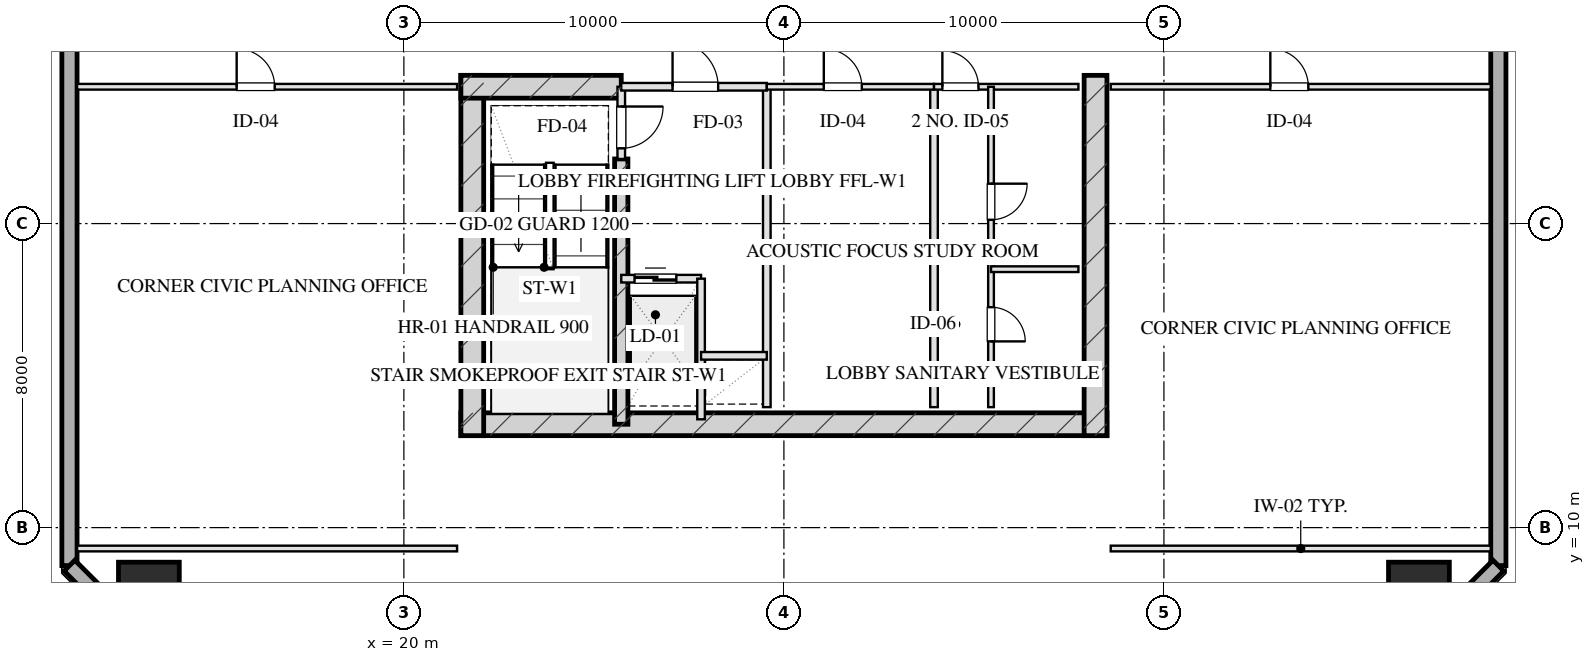
"""IFC4 building model, lengths in metres.
Left out: names, types, materials, properties, quantities, classifications, styles, units other than length and angle.
Written with IfcOpenShell. Run it as: python <this file> out.ifc"""

import sys

from ifc_helpers import new_model, si_unit, direction, frame, frame_2d, origin, origin_2d, place, context, subcontext, project, spatial, rectangle, hollow_rectangle, extrude, element, fill, save


model = new_model("IFC4")
c1 = context("Model", 3, precision=1e-05, world=origin(), true_north=direction((0.0, 1.0)))
c2 = subcontext(c1, "Body", "Model", "MODEL_VIEW")
j1 = project(units=[si_unit("LENGTHUNIT", "METRE"), si_unit("PLANEANGLEUNIT", "RADIAN")], contexts=[c1])
p1 = place(None, origin())
s1 = spatial("IfcSite", under=j1, at=p1, CompositionType="ELEMENT")
p2 = place(p1, origin())
s2 = spatial("IfcBuilding", under=s1, at=p2, CompositionType="ELEMENT")
p3 = place(p2, frame((0.0, 0.0, 146.05)))
s3 = spatial("IfcBuildingStorey", under=s2, at=p3, CompositionType="ELEMENT", Elevation=146.05)
p4 = place(p3, frame((21.5, 12.72, 0.0), z_axis=(0.0, 0.0, 1.0), x_axis=(1.0, 0.0, 0.0)))
e1 = element("IfcWall", 1, at=p4, inside=s3, PredefinedType="SHEAR", context=c2, shape_type="SweptSolid", body=[
    extrude(rectangle(XDim=17.0, YDim=0.6, at=frame_2d((8.5, 0.0))), origin(), (0.0, 0.0, 1.0), 3.45),
])
for number, where, z_axis, x_axis in (
    (2, (21.8, 21.9, 0.0), (0.0, 0.0, 1.0), (0.0, -1.0, 0.0)),
    (3, (38.2, 21.9, 0.0), (0.0, 0.0, 1.0), (0.0, -1.0, 0.0)),
):
    element("IfcWall", number, at=place(p3, frame(where, z_axis=z_axis, x_axis=x_axis)), inside=s3, PredefinedType="SHEAR", context=c2, shape_type="SweptSolid", body=[
        extrude(rectangle(XDim=9.48, YDim=0.6, at=frame_2d((4.74, 0.0))), origin(), (0.0, 0.0, 1.0), 3.45),
    ])
p5 = place(p3, frame((25.72, 19.7, 0.0), z_axis=(0.0, 0.0, 1.0), x_axis=(0.0, -1.0, 0.0)))
e4 = element("IfcWall", 4, at=p5, inside=s3, PredefinedType="SHEAR", context=c2, shape_type="SweptSolid", body=[
    extrude(rectangle(XDim=6.98, YDim=0.35, at=frame_2d((3.49, 0.0))), origin(), (0.0, 0.0, 1.0), 3.45),
])
p6 = place(p3, frame((21.5, 21.6, 0.0), z_axis=(0.0, 0.0, 1.0), x_axis=(1.0, 0.0, 0.0)))
e5 = element("IfcWall", 5, at=p6, inside=s3, PredefinedType="SHEAR", context=c2, shape_type="SweptSolid", body=[
    extrude(rectangle(XDim=4.22, YDim=0.6, at=frame_2d((2.11, 0.0))), origin(), (0.0, 0.0, 1.0), 3.45),
])
for number, where, z_axis, x_axis in (
    (6, (13.29, 8.29, 0.0), (0.0, 0.0, 1.0), (1.0, 0.0, 0.0)),
    (7, (46.71, 8.29, 0.0), (0.0, 0.0, 1.0), (1.0, 0.0, 0.0)),
):
    element("IfcColumn", number, at=place(p3, frame(where, z_axis=z_axis, x_axis=x_axis)), inside=s3, PredefinedType="COLUMN", context=c2, shape_type="SweptSolid", body=[
        extrude(hollow_rectangle(XDim=1.6, YDim=1.6, WallThickness=0.055, at=origin_2d()), origin(), (0.0, 0.0, 1.0), 3.451),
    ])
p7 = place(p3, frame((11.2, 9.0, 0.0), z_axis=(0.0, 0.0, 1.0), x_axis=(0.0, 1.0, 0.0)))
e8 = element("IfcWall", 8, at=p7, inside=s3, PredefinedType="SOLIDWALL", context=c2, shape_type="SweptSolid", body=[
    extrude(rectangle(XDim=50.0, YDim=0.4, at=frame_2d((25.0, 0.0))), origin(), (0.0, 0.0, 1.0), 2.61),
])
p8 = place(p7, frame((20.05, 0.0, 0.0)))
e9 = element("IfcOpeningElement", 9, at=p8, cuts=e8, PredefinedType="OPENING", context=c2, shape_type="SweptSolid", body=[
    extrude(rectangle(XDim=1.1, YDim=2.15, at=frame_2d((0.55, 1.075))), frame((0.0, 0.21, 0.0), z_axis=(0.0, -1.0, 0.0), x_axis=(1.0, 0.0, 0.0)), (0.0, 0.0, 1.0), 0.42),
])
p9 = place(p3, frame((48.8, 59.0, 0.0), z_axis=(0.0, 0.0, 1.0), x_axis=(0.0, -1.0, 0.0)))
e10 = element("IfcWall", 10, at=p9, inside=s3, PredefinedType="SOLIDWALL", context=c2, shape_type="SweptSolid", body=[
    extrude(rectangle(XDim=50.0, YDim=0.4, at=frame_2d((25.0, 0.0))), origin(), (0.0, 0.0, 1.0), 2.61),
])
p10 = place(p9, frame((17.475, 0.0, 0.75)))
e11 = element("IfcOpeningElement", 11, at=p10, cuts=e10, PredefinedType="OPENING", context=c2, shape_type="SweptSolid", body=[
    extrude(rectangle(XDim=2.25, YDim=1.46, at=frame_2d((1.125, 0.73))), frame((0.0, 0.21, 0.0), z_axis=(0.0, -1.0, 0.0), x_axis=(1.0, 0.0, 0.0)), (0.0, 0.0, 1.0), 0.42),
])
p11 = place(p9, frame((30.258, 0.0, 0.0)))
e12 = element("IfcOpeningElement", 12, at=p11, cuts=e10, PredefinedType="OPENING", context=c2, shape_type="SweptSolid", body=[
    extrude(rectangle(XDim=1.1, YDim=2.15, at=frame_2d((0.55, 1.075))), frame((0.0, 0.21, 0.0), z_axis=(0.0, -1.0, 0.0), x_axis=(1.0, 0.0, 0.0)), (0.0, 0.0, 1.0), 0.42),
])
for number, where, z_axis, x_axis in (
    (13, (48.8, 9.0, 0.0), (0.0, 0.0, 1.0), (-0.707, -0.707, 0.0)),
    (14, (14.0, 6.2, 0.0), (0.0, 0.0, 1.0), (-0.707, 0.707, 0.0)),
):
    element("IfcWall", number, at=place(p3, frame(where, z_axis=z_axis, x_axis=x_axis)), inside=s3, PredefinedType="SOLIDWALL", context=c2, shape_type="SweptSolid", body=[
        extrude(rectangle(XDim=3.96, YDim=0.4, at=frame_2d((1.98, 0.0))), origin(), (0.0, 0.0, 1.0), 2.61),
    ])
p12 = place(p3, frame((25.72, 21.6, 0.0), z_axis=(0.0, 0.0, 1.0), x_axis=(0.0, -1.0, 0.0)))
e15 = element("IfcWall", 15, at=p12, inside=s3, PredefinedType="PARTITIONING", context=c2, shape_type="SweptSolid", body=[
    extrude(rectangle(XDim=1.9, YDim=0.2, at=frame_2d((0.95, 0.0))), origin(), (0.0, 0.0, 1.0), 3.175),
])
p13 = place(p12, frame((0.52, 0.0, 0.0)))
e16 = element("IfcOpeningElement", 16, at=p13, cuts=e15, PredefinedType="OPENING", context=c2, shape_type="SweptSolid", body=[
    extrude(rectangle(XDim=1.1, YDim=2.05, at=frame_2d((0.55, 1.025))), frame((0.0, 0.11, 0.0), z_axis=(0.0, -1.0, 0.0), x_axis=(1.0, 0.0, 0.0)), (0.0, 0.0, 1.0), 0.22),
])
p14 = place(p3, frame((29.55, 21.6, 0.0), z_axis=(0.0, 0.0, 1.0), x_axis=(0.0, -1.0, 0.0)))
e17 = element("IfcWall", 17, at=p14, inside=s3, PredefinedType="PARTITIONING", context=c2, shape_type="SweptSolid", body=[
    extrude(rectangle(XDim=8.43, YDim=0.2, at=frame_2d((4.215, 0.0))), origin(), (0.0, 0.0, 1.0), 3.175),
])
p15 = place(p3, frame((25.72, 21.6, 0.0), z_axis=(0.0, 0.0, 1.0), x_axis=(1.0, 0.0, 0.0)))
e18 = element("IfcWall", 18, at=p15, inside=s3, PredefinedType="PARTITIONING", context=c2, shape_type="SweptSolid", body=[
    extrude(rectangle(XDim=3.83, YDim=0.2, at=frame_2d((1.915, 0.0))), origin(), (0.0, 0.0, 1.0), 3.175),
])
p16 = place(p15, frame((1.35, 0.0, 0.0)))
e19 = element("IfcOpeningElement", 19, at=p16, cuts=e18, PredefinedType="OPENING", context=c2, shape_type="SweptSolid", body=[
    extrude(rectangle(XDim=1.2, YDim=2.05, at=frame_2d((0.6, 1.025))), frame((0.0, 0.11, 0.0), z_axis=(0.0, -1.0, 0.0), x_axis=(1.0, 0.0, 0.0)), (0.0, 0.0, 1.0), 0.22),
])
p17 = place(p3, frame((25.72, 16.55, 0.0), z_axis=(0.0, 0.0, 1.0), x_axis=(1.0, 0.0, 0.0)))
e20 = element("IfcWall", 20, at=p17, inside=s3, PredefinedType="PARTITIONING", context=c2, shape_type="SweptSolid", body=[
    extrude(rectangle(XDim=2.1, YDim=0.2, at=frame_2d((1.05, 0.0))), origin(), (0.0, 0.0, 1.0), 3.175),
])
p18 = place(p17, frame((0.35, 0.0, 0.0)))
e21 = element("IfcOpeningElement", 21, at=p18, cuts=e20, PredefinedType="OPENING", context=c2, shape_type="SweptSolid", body=[
    extrude(rectangle(XDim=1.1, YDim=2.05, at=frame_2d((0.55, 1.025))), frame((0.0, 0.11, 0.0), z_axis=(0.0, -1.0, 0.0), x_axis=(1.0, 0.0, 0.0)), (0.0, 0.0, 1.0), 0.22),
])
p19 = place(p3, frame((27.82, 16.55, 0.0), z_axis=(0.0, 0.0, 1.0), x_axis=(0.0, -1.0, 0.0)))
e22 = element("IfcWall", 22, at=p19, inside=s3, PredefinedType="PARTITIONING", context=c2, shape_type="SweptSolid", body=[
    extrude(rectangle(XDim=3.7, YDim=0.2, at=frame_2d((1.85, 0.0))), origin(), (0.0, 0.0, 1.0), 3.175),
])
p20 = place(p3, frame((27.82, 14.52, 0.0), z_axis=(0.0, 0.0, 1.0), x_axis=(1.0, 0.0, 0.0)))
e23 = element("IfcWall", 23, at=p20, inside=s3, PredefinedType="PARTITIONING", context=c2, shape_type="SweptSolid", body=[
    extrude(rectangle(XDim=1.73, YDim=0.2, at=frame_2d((0.865, 0.0))), origin(), (0.0, 0.0, 1.0), 3.175),
])
p21 = place(p3, frame((33.95, 21.6, 0.0), z_axis=(0.0, 0.0, 1.0), x_axis=(0.0, -1.0, 0.0)))
e24 = element("IfcWall", 24, at=p21, inside=s3, PredefinedType="PARTITIONING", context=c2, shape_type="SweptSolid", body=[
    extrude(rectangle(XDim=8.43, YDim=0.2, at=frame_2d((4.215, 0.0))), origin(), (0.0, 0.0, 1.0), 3.175),
])
p22 = place(p3, frame((29.55, 21.6, 0.0), z_axis=(0.0, 0.0, 1.0), x_axis=(1.0, 0.0, 0.0)))
e25 = element("IfcWall", 25, at=p22, inside=s3, PredefinedType="PARTITIONING", context=c2, shape_type="SweptSolid", body=[
    extrude(rectangle(XDim=4.4, YDim=0.15, at=frame_2d((2.2, 0.0))), origin(), (0.0, 0.0, 1.0), 3.175),
])
p23 = place(p22, frame((1.5, 0.0, 0.0)))
e26 = element("IfcOpeningElement", 26, at=p23, cuts=e25, PredefinedType="OPENING", context=c2, shape_type="SweptSolid", body=[
    extrude(rectangle(XDim=1.0, YDim=2.05, at=frame_2d((0.5, 1.025))), frame((0.0, 0.085, 0.0), z_axis=(0.0, -1.0, 0.0), x_axis=(1.0, 0.0, 0.0)), (0.0, 0.0, 1.0), 0.17),
])
p24 = place(p3, frame((29.55, 17.3, 0.0), z_axis=(0.0, 0.0, 1.0), x_axis=(1.0, 0.0, 0.0)))
e27 = element("IfcWall", 27, at=p24, inside=s3, PredefinedType="PARTITIONING", context=c2, shape_type="SweptSolid", body=[
    extrude(rectangle(XDim=4.4, YDim=0.15, at=frame_2d((2.2, 0.0))), origin(), (0.0, 0.0, 1.0), 3.175),
])
p25 = place(p3, frame((33.95, 21.6, 0.0), z_axis=(0.0, 0.0, 1.0), x_axis=(1.0, 0.0, 0.0)))
e28 = element("IfcWall", 28, at=p25, inside=s3, PredefinedType="PARTITIONING", context=c2, shape_type="SweptSolid", body=[
    extrude(rectangle(XDim=3.8, YDim=0.15, at=frame_2d((1.9, 0.0))), origin(), (0.0, 0.0, 1.0), 3.175),
])
p26 = place(p25, frame((0.22, 0.0, 0.0)))
e29 = element("IfcOpeningElement", 29, at=p26, cuts=e28, PredefinedType="OPENING", context=c2, shape_type="SweptSolid", body=[
    extrude(rectangle(XDim=0.95, YDim=2.05, at=frame_2d((0.475, 1.025))), frame((0.0, 0.085, 0.0), z_axis=(0.0, -1.0, 0.0), x_axis=(1.0, 0.0, 0.0)), (0.0, 0.0, 1.0), 0.17),
])
p27 = place(p3, frame((35.45, 21.6, 0.0), z_axis=(0.0, 0.0, 1.0), x_axis=(0.0, -1.0, 0.0)))
e30 = element("IfcWall", 30, at=p27, inside=s3, PredefinedType="PARTITIONING", context=c2, shape_type="SweptSolid", body=[
    extrude(rectangle(XDim=8.43, YDim=0.15, at=frame_2d((4.215, 0.0))), origin(), (0.0, 0.0, 1.0), 2.765),
])
p28 = place(p27, frame((2.55, 0.0, 0.0)))
e31 = element("IfcOpeningElement", 31, at=p28, cuts=e30, PredefinedType="OPENING", context=c2, shape_type="SweptSolid", body=[
    extrude(rectangle(XDim=0.95, YDim=2.05, at=frame_2d((0.475, 1.025))), frame((0.0, 0.085, 0.0), z_axis=(0.0, -1.0, 0.0), x_axis=(1.0, 0.0, 0.0)), (0.0, 0.0, 1.0), 0.17),
])
p29 = place(p27, frame((5.8, 0.0, 0.0)))
e32 = element("IfcOpeningElement", 32, at=p29, cuts=e30, PredefinedType="OPENING", context=c2, shape_type="SweptSolid", body=[
    extrude(rectangle(XDim=0.9, YDim=2.05, at=frame_2d((0.45, 1.025))), frame((0.0, 0.085, 0.0), z_axis=(0.0, -1.0, 0.0), x_axis=(1.0, 0.0, 0.0)), (0.0, 0.0, 1.0), 0.17),
])
p30 = place(p3, frame((35.45, 16.8, 0.0), z_axis=(0.0, 0.0, 1.0), x_axis=(1.0, 0.0, 0.0)))
e33 = element("IfcWall", 33, at=p30, inside=s3, PredefinedType="PARTITIONING", context=c2, shape_type="SweptSolid", body=[
    extrude(rectangle(XDim=2.3, YDim=0.15, at=frame_2d((1.15, 0.0))), origin(), (0.0, 0.0, 1.0), 3.175),
])
p31 = place(p3, frame((11.4, 9.45, 0.0), z_axis=(0.0, 0.0, 1.0), x_axis=(1.0, 0.0, 0.0)))
e34 = element("IfcWall", 34, at=p31, inside=s3, PredefinedType="PARTITIONING", context=c2, shape_type="SweptSolid", body=[
    extrude(rectangle(XDim=10.0, YDim=0.15, at=frame_2d((5.0, 0.0))), origin(), (0.0, 0.0, 1.0), 3.175),
])
p32 = place(p3, frame((11.4, 21.6, 0.0), z_axis=(0.0, 0.0, 1.0), x_axis=(1.0, 0.0, 0.0)))
e35 = element("IfcWall", 35, at=p32, inside=s3, PredefinedType="PARTITIONING", context=c2, shape_type="SweptSolid", body=[
    extrude(rectangle(XDim=10.0, YDim=0.15, at=frame_2d((5.0, 0.0))), origin(), (0.0, 0.0, 1.0), 3.175),
])
p33 = place(p32, frame((4.2, 0.0, 0.0)))
e36 = element("IfcOpeningElement", 36, at=p33, cuts=e35, PredefinedType="OPENING", context=c2, shape_type="SweptSolid", body=[
    extrude(rectangle(XDim=1.0, YDim=2.05, at=frame_2d((0.5, 1.025))), frame((0.0, 0.085, 0.0), z_axis=(0.0, -1.0, 0.0), x_axis=(1.0, 0.0, 0.0)), (0.0, 0.0, 1.0), 0.17),
])
p34 = place(p3, frame((38.6, 9.45, 0.0), z_axis=(0.0, 0.0, 1.0), x_axis=(1.0, 0.0, 0.0)))
e37 = element("IfcWall", 37, at=p34, inside=s3, PredefinedType="PARTITIONING", context=c2, shape_type="SweptSolid", body=[
    extrude(rectangle(XDim=10.0, YDim=0.15, at=frame_2d((5.0, 0.0))), origin(), (0.0, 0.0, 1.0), 3.175),
])
p35 = place(p3, frame((38.6, 21.6, 0.0), z_axis=(0.0, 0.0, 1.0), x_axis=(1.0, 0.0, 0.0)))
e38 = element("IfcWall", 38, at=p35, inside=s3, PredefinedType="PARTITIONING", context=c2, shape_type="SweptSolid", body=[
    extrude(rectangle(XDim=10.0, YDim=0.15, at=frame_2d((5.0, 0.0))), origin(), (0.0, 0.0, 1.0), 3.175),
])
p36 = place(p35, frame((4.2, 0.0, 0.0)))
e39 = element("IfcOpeningElement", 39, at=p36, cuts=e38, PredefinedType="OPENING", context=c2, shape_type="SweptSolid", body=[
    extrude(rectangle(XDim=1.0, YDim=2.05, at=frame_2d((0.5, 1.025))), frame((0.0, 0.085, 0.0), z_axis=(0.0, -1.0, 0.0), x_axis=(1.0, 0.0, 0.0)), (0.0, 0.0, 1.0), 0.17),
])
p37 = place(p13, origin())
e40 = element("IfcDoor", 40, at=p37, inside=s3, OperationType="SINGLE_SWING_LEFT", PredefinedType="DOOR", context=c2, shape_type="SweptSolid", body=[
    extrude(rectangle(XDim=1.1, YDim=2.05, at=frame_2d((0.55, 1.025))), frame((0.0, 0.025, 0.0), z_axis=(0.0, -1.0, 0.0), x_axis=(1.0, 0.0, 0.0)), (0.0, 0.0, 1.0), 0.05),
])
fill(e16, e40)
p38 = place(p16, origin())
e41 = element("IfcDoor", 41, at=p38, inside=s3, OperationType="SINGLE_SWING_LEFT", PredefinedType="DOOR", context=c2, shape_type="SweptSolid", body=[
    extrude(rectangle(XDim=1.2, YDim=2.05, at=frame_2d((0.6, 1.025))), frame((0.0, 0.025, 0.0), z_axis=(0.0, -1.0, 0.0), x_axis=(1.0, 0.0, 0.0)), (0.0, 0.0, 1.0), 0.05),
])
fill(e19, e41)
p39 = place(p18, origin())
e42 = element("IfcDoor", 42, at=p39, inside=s3, OperationType="DOUBLE_DOOR_SLIDING", PredefinedType="DOOR", context=c2, shape_type="SweptSolid", body=[
    extrude(rectangle(XDim=1.1, YDim=2.05, at=frame_2d((0.55, 1.025))), frame((0.0, 0.025, 0.0), z_axis=(0.0, -1.0, 0.0), x_axis=(1.0, 0.0, 0.0)), (0.0, 0.0, 1.0), 0.05),
])
fill(e21, e42)
p40 = place(p23, origin())
e43 = element("IfcDoor", 43, at=p40, inside=s3, OperationType="SINGLE_SWING_LEFT", PredefinedType="DOOR", context=c2, shape_type="SweptSolid", body=[
    extrude(rectangle(XDim=1.0, YDim=2.05, at=frame_2d((0.5, 1.025))), frame((0.0, 0.025, 0.0), z_axis=(0.0, -1.0, 0.0), x_axis=(1.0, 0.0, 0.0)), (0.0, 0.0, 1.0), 0.05),
])
fill(e26, e43)
p41 = place(p26, origin())
e44 = element("IfcDoor", 44, at=p41, inside=s3, OperationType="SINGLE_SWING_LEFT", PredefinedType="DOOR", context=c2, shape_type="SweptSolid", body=[
    extrude(rectangle(XDim=0.95, YDim=2.05, at=frame_2d((0.475, 1.025))), frame((0.0, 0.025, 0.0), z_axis=(0.0, -1.0, 0.0), x_axis=(1.0, 0.0, 0.0)), (0.0, 0.0, 1.0), 0.05),
])
fill(e29, e44)
p42 = place(p28, origin())
e45 = element("IfcDoor", 45, at=p42, inside=s3, OperationType="SINGLE_SWING_LEFT", PredefinedType="DOOR", context=c2, shape_type="SweptSolid", body=[
    extrude(rectangle(XDim=0.95, YDim=2.05, at=frame_2d((0.475, 1.025))), frame((0.0, 0.025, 0.0), z_axis=(0.0, -1.0, 0.0), x_axis=(1.0, 0.0, 0.0)), (0.0, 0.0, 1.0), 0.05),
])
fill(e31, e45)
p43 = place(p29, origin())
e46 = element("IfcDoor", 46, at=p43, inside=s3, OperationType="SINGLE_SWING_RIGHT", PredefinedType="DOOR", context=c2, shape_type="SweptSolid", body=[
    extrude(rectangle(XDim=0.9, YDim=2.05, at=frame_2d((0.45, 1.025))), frame((0.0, 0.025, 0.0), z_axis=(0.0, -1.0, 0.0), x_axis=(1.0, 0.0, 0.0)), (0.0, 0.0, 1.0), 0.05),
])
fill(e32, e46)
p44 = place(p33, origin())
e47 = element("IfcDoor", 47, at=p44, inside=s3, OperationType="SINGLE_SWING_LEFT", PredefinedType="DOOR", context=c2, shape_type="SweptSolid", body=[
    extrude(rectangle(XDim=1.0, YDim=2.05, at=frame_2d((0.5, 1.025))), frame((0.0, 0.025, 0.0), z_axis=(0.0, -1.0, 0.0), x_axis=(1.0, 0.0, 0.0)), (0.0, 0.0, 1.0), 0.05),
])
fill(e36, e47)
p45 = place(p36, origin())
e48 = element("IfcDoor", 48, at=p45, inside=s3, OperationType="SINGLE_SWING_LEFT", PredefinedType="DOOR", context=c2, shape_type="SweptSolid", body=[
    extrude(rectangle(XDim=1.0, YDim=2.05, at=frame_2d((0.5, 1.025))), frame((0.0, 0.025, 0.0), z_axis=(0.0, -1.0, 0.0), x_axis=(1.0, 0.0, 0.0)), (0.0, 0.0, 1.0), 0.05),
])
fill(e39, e48)
save(model, sys.argv[1])
